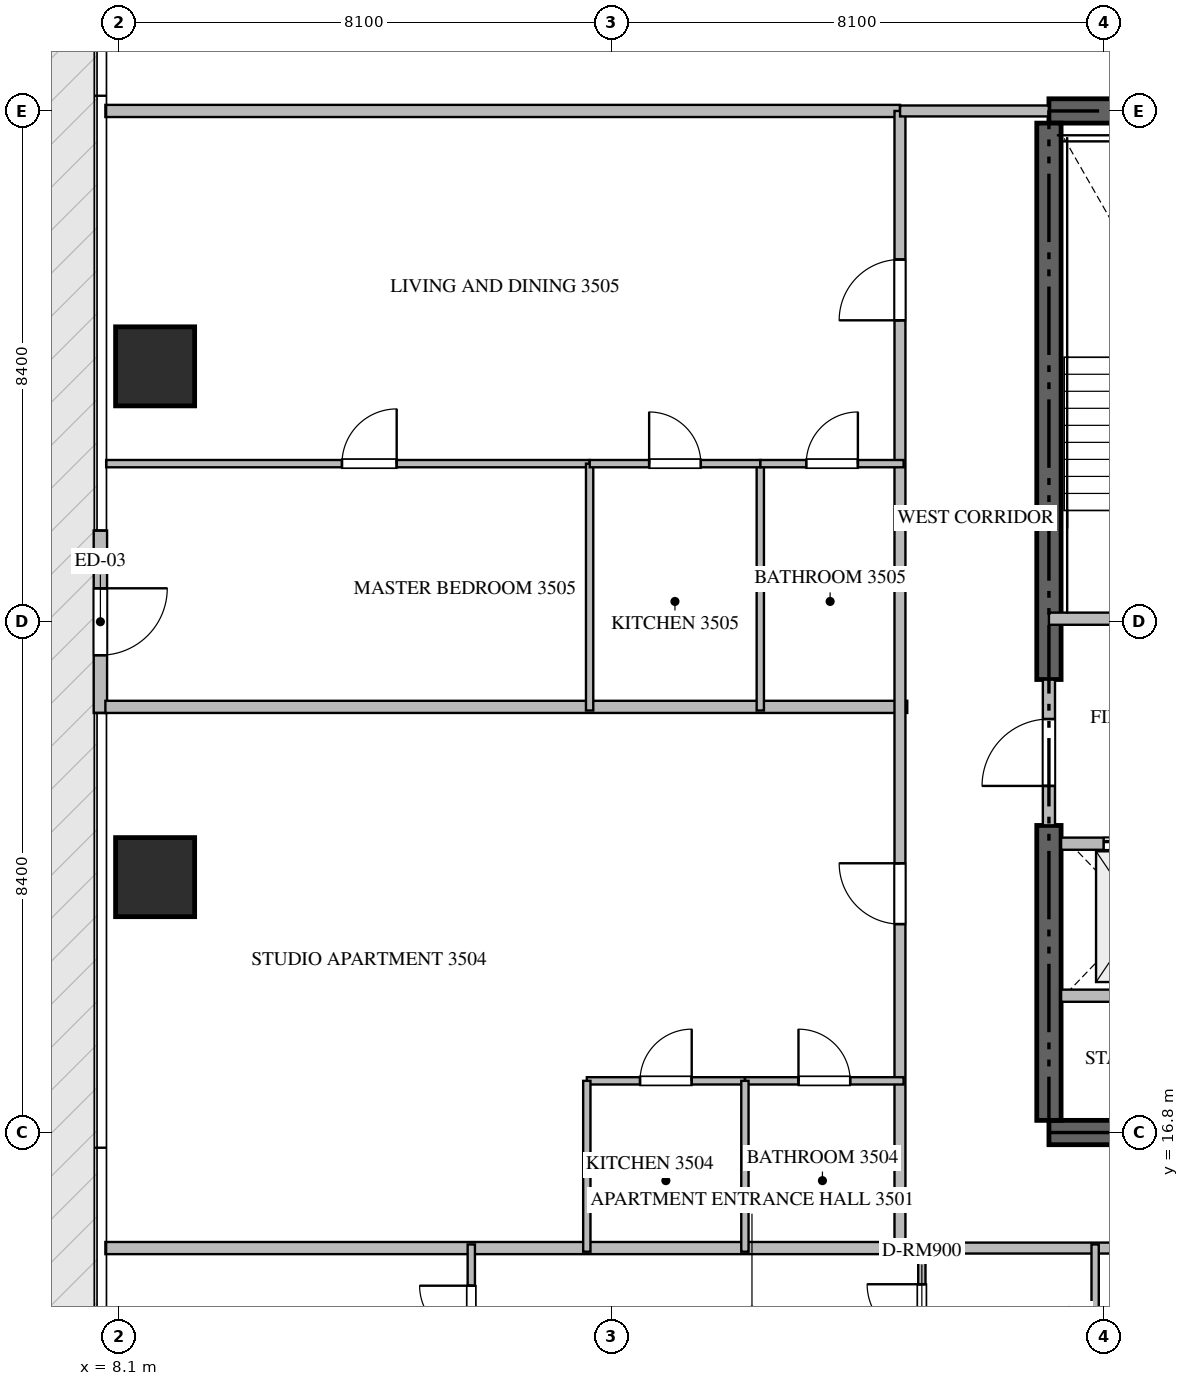
"""IFC4 building model, lengths in metres.
Left out: names, types, materials, properties, quantities, classifications, styles, units other than length and angle.
Written with IfcOpenShell. Run it as: python <this file> out.ifc"""

import sys

from ifc_helpers import new_model, si_unit, direction, frame, frame_2d, origin, origin_2d, place, context, subcontext, project, spatial, rectangle, extrude, source, transform, mapped, element, fill, save


model = new_model("IFC4")
c1 = context("Model", 3, precision=1e-05, world=origin(), true_north=direction((0.0, 1.0)))
c2 = subcontext(c1, "Body", "Model", "MODEL_VIEW")
j1 = project(units=[si_unit("LENGTHUNIT", "METRE"), si_unit("PLANEANGLEUNIT", "RADIAN")], contexts=[c1])
p1 = place(None, origin())
s1 = spatial("IfcSite", under=j1, at=p1, CompositionType="ELEMENT")
p2 = place(p1, origin())
s2 = spatial("IfcBuilding", under=s1, at=p2, CompositionType="ELEMENT")
p3 = place(p2, frame((0.0, 0.0, 142.65)))
s3 = spatial("IfcBuildingStorey", under=s2, at=p3, CompositionType="ELEMENT", Elevation=142.65)
for number, where, z_axis, x_axis in (
    (1, (23.4, 16.8, -0.26), (0.0, 0.0, 1.0), (1.0, 0.0, 0.0)),
    (2, (41.4, 33.6, -0.26), (0.0, 0.0, 1.0), (-1.0, 0.0, 0.0)),
):
    element("IfcWall", number, at=place(p3, frame(where, z_axis=z_axis, x_axis=x_axis)), inside=s3, PredefinedType="SHEAR", context=c2, shape_type="SweptSolid", body=[
        extrude(rectangle(XDim=18.0, YDim=0.4, at=frame_2d((9.0, 0.0))), origin(), (0.0, 0.0, 1.0), 3.748),
    ])
p4 = place(p3, frame((23.4, 17.0, -0.26), z_axis=(0.0, 0.0, 1.0), x_axis=(0.0, 1.0, 0.0)))
e3 = element("IfcWall", 3, at=p4, inside=s3, PredefinedType="SHEAR", context=c2, shape_type="SweptSolid", body=[
    extrude(rectangle(XDim=4.85, YDim=0.4, at=frame_2d((2.425, 0.0))), origin(), (0.0, 0.0, 1.0), 3.748),
])
p5 = place(p3, frame((23.4, 24.25, -0.26), z_axis=(0.0, 0.0, 1.0), x_axis=(0.0, 1.0, 0.0)))
e4 = element("IfcWall", 4, at=p5, inside=s3, PredefinedType="SHEAR", context=c2, shape_type="SweptSolid", body=[
    extrude(rectangle(XDim=9.15, YDim=0.4, at=frame_2d((4.575, 0.0))), origin(), (0.0, 0.0, 1.0), 3.748),
])
m1 = source(origin(), c2, "Body", "SweptSolid", [
    extrude(rectangle(XDim=1.3, YDim=1.3, at=origin_2d()), origin(), (0.0, 0.0, 1.0), 3.75),
])
for number, where, z_axis, x_axis in (
    (5, (8.7, 21.0, -0.26), (0.0, 0.0, 1.0), (1.0, 0.0, 0.0)),
    (6, (8.7, 29.4, -0.26), (0.0, 0.0, 1.0), (1.0, 0.0, 0.0)),
):
    element("IfcColumn", number, at=place(p3, frame(where, z_axis=z_axis, x_axis=x_axis)), inside=s3, PredefinedType="COLUMN", context=c2, shape_type="MappedRepresentation", body=[
        mapped(m1, transform((0.0, 0.0, 0.0), scale=1.0)),
    ])
p6 = place(p3, frame((7.8, 26.7, 0.0), z_axis=(0.0, 0.0, 1.0), x_axis=(0.0, -1.0, 0.0)))
e7 = element("IfcWall", 7, at=p6, inside=s3, PredefinedType="ELEMENTEDWALL", context=c2, shape_type="SweptSolid", body=[
    extrude(rectangle(XDim=3.0, YDim=0.22, at=frame_2d((1.5, 0.0))), origin(), (0.0, 0.0, 1.0), 3.475),
])
p7 = place(p6, frame((0.95, 0.0, 0.0)))
e8 = element("IfcOpeningElement", 8, at=p7, cuts=e7, PredefinedType="OPENING", context=c2, shape_type="SweptSolid", body=[
    extrude(rectangle(XDim=1.1, YDim=2.2, at=frame_2d((0.55, 1.1))), frame((0.0, 0.12, 0.0), z_axis=(0.0, -1.0, 0.0), x_axis=(1.0, 0.0, 0.0)), (0.0, 0.0, 1.0), 0.24),
])
p8 = place(p3, frame((23.4, 25.25, 0.0), z_axis=(0.0, 0.0, 1.0), x_axis=(1.0, 0.0, 0.0)))
e9 = element("IfcWall", 9, at=p8, inside=s3, PredefinedType="STANDARD", context=c2, shape_type="SweptSolid", body=[
    extrude(rectangle(XDim=4.45, YDim=0.2, at=frame_2d((2.225, 0.0))), origin(), (0.0, 0.0, 1.0), 3.49),
])
p9 = place(p8, frame((1.65, 0.0, 0.0)))
e10 = element("IfcOpeningElement", 10, at=p9, cuts=e9, PredefinedType="OPENING", context=c2, shape_type="SweptSolid", body=[
    extrude(rectangle(XDim=1.1, YDim=2.15, at=frame_2d((0.55, 1.075))), frame((0.0, 0.11, 0.0), z_axis=(0.0, -1.0, 0.0), x_axis=(1.0, 0.0, 0.0)), (0.0, 0.0, 1.0), 0.22),
])
p10 = place(p3, frame((23.6, 21.55, 0.0), z_axis=(0.0, 0.0, 1.0), x_axis=(1.0, 0.0, 0.0)))
e11 = element("IfcWall", 11, at=p10, inside=s3, PredefinedType="STANDARD", context=c2, shape_type="SweptSolid", body=[
    extrude(rectangle(XDim=2.45, YDim=0.2, at=frame_2d((1.225, 0.0))), origin(), (0.0, 0.0, 1.0), 3.49),
])
p11 = place(p10, frame((0.7, 0.0, 0.0)))
e12 = element("IfcOpeningElement", 12, at=p11, cuts=e11, PredefinedType="OPENING", context=c2, shape_type="SweptSolid", body=[
    extrude(rectangle(XDim=1.2, YDim=2.2, at=frame_2d((0.6, 1.1))), frame((0.0, 0.11, 0.0), z_axis=(0.0, -1.0, 0.0), x_axis=(1.0, 0.0, 0.0)), (0.0, 0.0, 1.0), 0.22),
])
p12 = place(p3, frame((23.6, 19.05, 0.0), z_axis=(0.0, 0.0, 1.0), x_axis=(1.0, 0.0, 0.0)))
e13 = element("IfcWall", 13, at=p12, inside=s3, PredefinedType="STANDARD", context=c2, shape_type="SweptSolid", body=[
    extrude(rectangle(XDim=2.45, YDim=0.2, at=frame_2d((1.225, 0.0))), origin(), (0.0, 0.0, 1.0), 3.49),
])
p13 = place(p3, frame((23.4, 21.852, 0.0), z_axis=(0.0, 0.0, 1.0), x_axis=(0.0, 1.0, 0.0)))
e14 = element("IfcWall", 14, at=p13, inside=s3, PredefinedType="STANDARD", context=c2, shape_type="SweptSolid", body=[
    extrude(rectangle(XDim=2.396, YDim=0.2, at=frame_2d((1.198, 0.0))), origin(), (0.0, 0.0, 1.0), 3.49),
])
p14 = place(p13, frame((0.648, 0.0, 0.0)))
e15 = element("IfcOpeningElement", 15, at=p14, cuts=e14, PredefinedType="OPENING", context=c2, shape_type="SweptSolid", body=[
    extrude(rectangle(XDim=1.1, YDim=2.15, at=frame_2d((0.55, 1.075))), frame((0.0, 0.11, 0.0), z_axis=(0.0, -1.0, 0.0), x_axis=(1.0, 0.0, 0.0)), (0.0, 0.0, 1.0), 0.22),
])
p15 = place(p3, frame((7.882, 23.8, 0.0), z_axis=(0.0, 0.0, 1.0), x_axis=(1.0, 0.0, 0.0)))
e16 = element("IfcWall", 16, at=p15, inside=s3, PredefinedType="PARTITIONING", context=c2, shape_type="SweptSolid", body=[
    extrude(rectangle(XDim=13.188, YDim=0.2, at=frame_2d((6.594, 0.0))), origin(), (0.0, 0.0, 1.0), 3.49),
])
for number, where, z_axis, x_axis in (
    (17, (7.882, 14.9, 0.0), (0.0, 0.0, 1.0), (1.0, 0.0, 0.0)),
    (18, (7.882, 33.6, 0.0), (0.0, 0.0, 1.0), (1.0, 0.0, 0.0)),
):
    element("IfcWall", number, at=place(p3, frame(where, z_axis=z_axis, x_axis=x_axis)), inside=s3, PredefinedType="PARTITIONING", context=c2, shape_type="SweptSolid", body=[
        extrude(rectangle(XDim=13.068, YDim=0.2, at=frame_2d((6.534, 0.0))), origin(), (0.0, 0.0, 1.0), 3.49),
    ])
p16 = place(p3, frame((20.952, 14.9, 0.0), z_axis=(0.0, 0.0, 1.0), x_axis=(1.0, 0.0, 0.0)))
e19 = element("IfcWall", 19, at=p16, inside=s3, PredefinedType="PARTITIONING", context=c2, shape_type="SweptSolid", body=[
    extrude(rectangle(XDim=22.896, YDim=0.18, at=frame_2d((11.448, 0.0))), origin(), (0.0, 0.0, 1.0), 3.49),
])
p17 = place(p16, frame((5.386, 0.0, 0.0)))
e20 = element("IfcOpeningElement", 20, at=p17, cuts=e19, PredefinedType="OPENING", context=c2, shape_type="SweptSolid", body=[
    extrude(rectangle(XDim=1.0, YDim=2.15, at=frame_2d((0.5, 1.075))), frame((0.0, 0.1, 0.0), z_axis=(0.0, -1.0, 0.0), x_axis=(1.0, 0.0, 0.0)), (0.0, 0.0, 1.0), 0.2),
])
p18 = place(p16, frame((10.948, 0.0, 0.0)))
e21 = element("IfcOpeningElement", 21, at=p18, cuts=e19, PredefinedType="OPENING", context=c2, shape_type="SweptSolid", body=[
    extrude(rectangle(XDim=1.0, YDim=2.15, at=frame_2d((0.5, 1.075))), frame((0.0, 0.1, 0.0), z_axis=(0.0, -1.0, 0.0), x_axis=(1.0, 0.0, 0.0)), (0.0, 0.0, 1.0), 0.2),
])
p19 = place(p3, frame((20.95, 14.9, 0.0), z_axis=(0.0, 0.0, 1.0), x_axis=(0.0, 1.0, 0.0)))
e22 = element("IfcWall", 22, at=p19, inside=s3, PredefinedType="PARTITIONING", context=c2, shape_type="SweptSolid", body=[
    extrude(rectangle(XDim=18.7, YDim=0.18, at=frame_2d((9.35, 0.0))), origin(), (0.0, 0.0, 1.0), 3.49),
])
p20 = place(p19, frame((5.328, 0.0, 0.0)))
e23 = element("IfcOpeningElement", 23, at=p20, cuts=e22, PredefinedType="OPENING", context=c2, shape_type="SweptSolid", body=[
    extrude(rectangle(XDim=1.0, YDim=2.15, at=frame_2d((0.5, 1.075))), frame((0.0, 0.1, 0.0), z_axis=(0.0, -1.0, 0.0), x_axis=(1.0, 0.0, 0.0)), (0.0, 0.0, 1.0), 0.2),
])
p21 = place(p19, frame((15.257, 0.0, 0.0)))
e24 = element("IfcOpeningElement", 24, at=p21, cuts=e22, PredefinedType="OPENING", context=c2, shape_type="SweptSolid", body=[
    extrude(rectangle(XDim=1.0, YDim=2.15, at=frame_2d((0.5, 1.075))), frame((0.0, 0.1, 0.0), z_axis=(0.0, -1.0, 0.0), x_axis=(1.0, 0.0, 0.0)), (0.0, 0.0, 1.0), 0.2),
])
p22 = place(p3, frame((20.952, 33.6, 0.0), z_axis=(0.0, 0.0, 1.0), x_axis=(1.0, 0.0, 0.0)))
e25 = element("IfcWall", 25, at=p22, inside=s3, PredefinedType="PARTITIONING", context=c2, shape_type="SweptSolid", body=[
    extrude(rectangle(XDim=2.446, YDim=0.18, at=frame_2d((1.223, 0.0))), origin(), (0.0, 0.0, 1.0), 3.49),
])
p23 = place(p3, frame((24.16, 12.15, 0.0), z_axis=(0.0, 0.0, 1.0), x_axis=(0.0, 1.0, 0.0)))
e26 = element("IfcWall", 26, at=p23, inside=s3, PredefinedType="PARTITIONING", context=c2, shape_type="SweptSolid", body=[
    extrude(rectangle(XDim=2.81, YDim=0.12, at=frame_2d((1.405, 0.0))), origin(), (0.0, 0.0, 1.0), 3.49),
])
p24 = place(p3, frame((21.31, 12.75, 0.0), z_axis=(0.0, 0.0, 1.0), x_axis=(0.0, 1.0, 0.0)))
e27 = element("IfcWall", 27, at=p24, inside=s3, PredefinedType="PARTITIONING", context=c2, shape_type="SweptSolid", body=[
    extrude(rectangle(XDim=2.21, YDim=0.12, at=frame_2d((1.105, 0.0))), origin(), (0.0, 0.0, 1.0), 3.49),
])
p25 = place(p24, frame((0.655, 0.0, 0.0)))
e28 = element("IfcOpeningElement", 28, at=p25, cuts=e27, PredefinedType="OPENING", context=c2, shape_type="SweptSolid", body=[
    extrude(rectangle(XDim=0.9, YDim=2.1, at=frame_2d((0.45, 1.05))), frame((0.0, 0.07, 0.0), z_axis=(0.0, -1.0, 0.0), x_axis=(1.0, 0.0, 0.0)), (0.0, 0.0, 1.0), 0.14),
])
p26 = place(p3, frame((13.9, 12.752, 0.0), z_axis=(0.0, 0.0, 1.0), x_axis=(0.0, 1.0, 0.0)))
e29 = element("IfcWall", 29, at=p26, inside=s3, PredefinedType="PARTITIONING", context=c2, shape_type="SweptSolid", body=[
    extrude(rectangle(XDim=2.208, YDim=0.12, at=frame_2d((1.104, 0.0))), origin(), (0.0, 0.0, 1.0), 3.49),
])
p27 = place(p26, frame((0.679, 0.0, 0.0)))
e30 = element("IfcOpeningElement", 30, at=p27, cuts=e29, PredefinedType="OPENING", context=c2, shape_type="SweptSolid", body=[
    extrude(rectangle(XDim=0.85, YDim=2.1, at=frame_2d((0.425, 1.05))), frame((0.0, 0.07, 0.0), z_axis=(0.0, -1.0, 0.0), x_axis=(1.0, 0.0, 0.0)), (0.0, 0.0, 1.0), 0.14),
])
p28 = place(p3, frame((15.8, 17.65, 0.0), z_axis=(0.0, 0.0, 1.0), x_axis=(1.0, 0.0, 0.0)))
e31 = element("IfcWall", 31, at=p28, inside=s3, PredefinedType="PARTITIONING", context=c2, shape_type="SweptSolid", body=[
    extrude(rectangle(XDim=2.6, YDim=0.12, at=frame_2d((1.3, 0.0))), origin(), (0.0, 0.0, 1.0), 3.49),
])
p29 = place(p28, frame((0.875, 0.0, 0.0)))
e32 = element("IfcOpeningElement", 32, at=p29, cuts=e31, PredefinedType="OPENING", context=c2, shape_type="SweptSolid", body=[
    extrude(rectangle(XDim=0.85, YDim=2.1, at=frame_2d((0.425, 1.05))), frame((0.0, 0.07, 0.0), z_axis=(0.0, -1.0, 0.0), x_axis=(1.0, 0.0, 0.0)), (0.0, 0.0, 1.0), 0.14),
])
p30 = place(p3, frame((18.402, 17.65, 0.0), z_axis=(0.0, 0.0, 1.0), x_axis=(1.0, 0.0, 0.0)))
e33 = element("IfcWall", 33, at=p30, inside=s3, PredefinedType="PARTITIONING", context=c2, shape_type="SweptSolid", body=[
    extrude(rectangle(XDim=2.608, YDim=0.12, at=frame_2d((1.304, 0.0))), origin(), (0.0, 0.0, 1.0), 3.49),
])
p31 = place(p30, frame((0.879, 0.0, 0.0)))
e34 = element("IfcOpeningElement", 34, at=p31, cuts=e33, PredefinedType="OPENING", context=c2, shape_type="SweptSolid", body=[
    extrude(rectangle(XDim=0.85, YDim=2.1, at=frame_2d((0.425, 1.05))), frame((0.0, 0.07, 0.0), z_axis=(0.0, -1.0, 0.0), x_axis=(1.0, 0.0, 0.0)), (0.0, 0.0, 1.0), 0.14),
])
for number, where, z_axis, x_axis in (
    (35, (18.4, 14.84, 0.0), (0.0, 0.0, 1.0), (0.0, 1.0, 0.0)),
    (36, (15.8, 14.84, 0.0), (0.0, 0.0, 1.0), (0.0, 1.0, 0.0)),
):
    element("IfcWall", number, at=place(p3, frame(where, z_axis=z_axis, x_axis=x_axis)), inside=s3, PredefinedType="PARTITIONING", context=c2, shape_type="SweptSolid", body=[
        extrude(rectangle(XDim=2.81, YDim=0.12, at=frame_2d((1.405, 0.0))), origin(), (0.0, 0.0, 1.0), 3.49),
    ])
p32 = place(p3, frame((7.895, 27.8, 0.0), z_axis=(0.0, 0.0, 1.0), x_axis=(1.0, 0.0, 0.0)))
e37 = element("IfcWall", 37, at=p32, inside=s3, PredefinedType="PARTITIONING", context=c2, shape_type="SweptSolid", body=[
    extrude(rectangle(XDim=7.951, YDim=0.12, at=frame_2d((3.976, 0.0))), origin(), (0.0, 0.0, 1.0), 3.49),
])
p33 = place(p32, frame((3.878, 0.0, 0.0)))
e38 = element("IfcOpeningElement", 38, at=p33, cuts=e37, PredefinedType="OPENING", context=c2, shape_type="SweptSolid", body=[
    extrude(rectangle(XDim=0.9, YDim=2.1, at=frame_2d((0.45, 1.05))), frame((0.0, 0.07, 0.0), z_axis=(0.0, -1.0, 0.0), x_axis=(1.0, 0.0, 0.0)), (0.0, 0.0, 1.0), 0.14),
])
for number, where, z_axis, x_axis in (
    (39, (15.846, 23.74, 0.0), (0.0, 0.0, 1.0), (0.0, 1.0, 0.0)),
    (40, (18.653, 23.74, 0.0), (0.0, 0.0, 1.0), (0.0, 1.0, 0.0)),
):
    element("IfcWall", number, at=place(p3, frame(where, z_axis=z_axis, x_axis=x_axis)), inside=s3, PredefinedType="PARTITIONING", context=c2, shape_type="SweptSolid", body=[
        extrude(rectangle(XDim=4.06, YDim=0.12, at=frame_2d((2.03, 0.0))), origin(), (0.0, 0.0, 1.0), 3.49),
    ])
p34 = place(p3, frame((15.848, 27.8, 0.0), z_axis=(0.0, 0.0, 1.0), x_axis=(1.0, 0.0, 0.0)))
e41 = element("IfcWall", 41, at=p34, inside=s3, PredefinedType="PARTITIONING", context=c2, shape_type="SweptSolid", body=[
    extrude(rectangle(XDim=2.805, YDim=0.12, at=frame_2d((1.403, 0.0))), origin(), (0.0, 0.0, 1.0), 3.49),
])
p35 = place(p34, frame((0.977, 0.0, 0.0)))
e42 = element("IfcOpeningElement", 42, at=p35, cuts=e41, PredefinedType="OPENING", context=c2, shape_type="SweptSolid", body=[
    extrude(rectangle(XDim=0.85, YDim=2.1, at=frame_2d((0.425, 1.05))), frame((0.0, 0.07, 0.0), z_axis=(0.0, -1.0, 0.0), x_axis=(1.0, 0.0, 0.0)), (0.0, 0.0, 1.0), 0.14),
])
p36 = place(p3, frame((18.655, 27.8, 0.0), z_axis=(0.0, 0.0, 1.0), x_axis=(1.0, 0.0, 0.0)))
e43 = element("IfcWall", 43, at=p36, inside=s3, PredefinedType="PARTITIONING", context=c2, shape_type="SweptSolid", body=[
    extrude(rectangle(XDim=2.355, YDim=0.12, at=frame_2d((1.177, 0.0))), origin(), (0.0, 0.0, 1.0), 3.49),
])
p37 = place(p36, frame((0.753, 0.0, 0.0)))
e44 = element("IfcOpeningElement", 44, at=p37, cuts=e43, PredefinedType="OPENING", context=c2, shape_type="SweptSolid", body=[
    extrude(rectangle(XDim=0.85, YDim=2.1, at=frame_2d((0.425, 1.05))), frame((0.0, 0.07, 0.0), z_axis=(0.0, -1.0, 0.0), x_axis=(1.0, 0.0, 0.0)), (0.0, 0.0, 1.0), 0.14),
])
m2 = source(origin(), c2, "Body", "SweptSolid", [
    extrude(rectangle(XDim=1.1, YDim=2.2, at=frame_2d((0.55, 1.1))), frame((0.0, 0.025, 0.0), z_axis=(0.0, -1.0, 0.0), x_axis=(1.0, 0.0, 0.0)), (0.0, 0.0, 1.0), 0.05),
])
p38 = place(p7, origin())
e45 = element("IfcDoor", 45, at=p38, inside=s3, OperationType="SINGLE_SWING_LEFT", PredefinedType="DOOR", context=c2, shape_type="MappedRepresentation", body=[
    mapped(m2, transform((0.0, 0.0, 0.0), scale=1.0)),
])
fill(e8, e45)
m3 = source(origin(), c2, "Body", "SweptSolid", [
    extrude(rectangle(XDim=1.2, YDim=2.2, at=frame_2d((0.6, 1.1))), frame((0.0, 0.025, 0.0), z_axis=(0.0, -1.0, 0.0), x_axis=(1.0, 0.0, 0.0)), (0.0, 0.0, 1.0), 0.05),
])
p39 = place(p11, origin())
e46 = element("IfcDoor", 46, at=p39, inside=s3, OperationType="DOUBLE_DOOR_SLIDING", PredefinedType="DOOR", context=c2, shape_type="MappedRepresentation", body=[
    mapped(m3, transform((0.0, 0.0, 0.0), scale=1.0)),
])
fill(e12, e46)
m4 = source(origin(), c2, "Body", "SweptSolid", [
    extrude(rectangle(XDim=1.1, YDim=2.15, at=frame_2d((0.55, 1.075))), frame((0.0, 0.025, 0.0), z_axis=(0.0, -1.0, 0.0), x_axis=(1.0, 0.0, 0.0)), (0.0, 0.0, 1.0), 0.05),
])
p40 = place(p14, origin())
e47 = element("IfcDoor", 47, at=p40, inside=s3, OperationType="SINGLE_SWING_LEFT", PredefinedType="DOOR", context=c2, shape_type="MappedRepresentation", body=[
    mapped(m4, transform((0.0, 0.0, 0.0), scale=1.0)),
])
fill(e15, e47)
m5 = source(origin(), c2, "Body", "SweptSolid", [
    extrude(rectangle(XDim=1.0, YDim=2.15, at=frame_2d((0.5, 1.075))), frame((0.0, 0.025, 0.0), z_axis=(0.0, -1.0, 0.0), x_axis=(1.0, 0.0, 0.0)), (0.0, 0.0, 1.0), 0.05),
])
p41 = place(p20, origin())
e48 = element("IfcDoor", 48, at=p41, inside=s3, OperationType="SINGLE_SWING_RIGHT", PredefinedType="DOOR", context=c2, shape_type="MappedRepresentation", body=[
    mapped(m5, transform((0.0, 0.0, 0.0), scale=1.0)),
])
fill(e23, e48)
p42 = place(p21, origin())
e49 = element("IfcDoor", 49, at=p42, inside=s3, OperationType="SINGLE_SWING_LEFT", PredefinedType="DOOR", context=c2, shape_type="MappedRepresentation", body=[
    mapped(m5, transform((0.0, 0.0, 0.0), scale=1.0)),
])
fill(e24, e49)
m6 = source(origin(), c2, "Body", "SweptSolid", [
    extrude(rectangle(XDim=0.9, YDim=2.1, at=frame_2d((0.45, 1.05))), frame((0.0, 0.025, 0.0), z_axis=(0.0, -1.0, 0.0), x_axis=(1.0, 0.0, 0.0)), (0.0, 0.0, 1.0), 0.05),
])
p43 = place(p25, origin())
e50 = element("IfcDoor", 50, at=p43, inside=s3, OperationType="SINGLE_SWING_RIGHT", PredefinedType="DOOR", context=c2, shape_type="MappedRepresentation", body=[
    mapped(m6, transform((0.0, 0.0, 0.0), scale=1.0)),
])
fill(e28, e50)
m7 = source(origin(), c2, "Body", "SweptSolid", [
    extrude(rectangle(XDim=0.85, YDim=2.1, at=frame_2d((0.425, 1.05))), frame((0.0, 0.025, 0.0), z_axis=(0.0, -1.0, 0.0), x_axis=(1.0, 0.0, 0.0)), (0.0, 0.0, 1.0), 0.05),
])
p44 = place(p27, origin())
e51 = element("IfcDoor", 51, at=p44, inside=s3, OperationType="SINGLE_SWING_RIGHT", PredefinedType="DOOR", context=c2, shape_type="MappedRepresentation", body=[
    mapped(m7, transform((0.0, 0.0, 0.0), scale=1.0)),
])
fill(e30, e51)
p45 = place(p29, origin())
e52 = element("IfcDoor", 52, at=p45, inside=s3, OperationType="SINGLE_SWING_RIGHT", PredefinedType="DOOR", context=c2, shape_type="MappedRepresentation", body=[
    mapped(m7, transform((0.0, 0.0, 0.0), scale=1.0)),
])
fill(e32, e52)
p46 = place(p31, origin())
e53 = element("IfcDoor", 53, at=p46, inside=s3, OperationType="SINGLE_SWING_LEFT", PredefinedType="DOOR", context=c2, shape_type="MappedRepresentation", body=[
    mapped(m7, transform((0.0, 0.0, 0.0), scale=1.0)),
])
fill(e34, e53)
p47 = place(p33, origin())
e54 = element("IfcDoor", 54, at=p47, inside=s3, OperationType="SINGLE_SWING_RIGHT", PredefinedType="DOOR", context=c2, shape_type="MappedRepresentation", body=[
    mapped(m6, transform((0.0, 0.0, 0.0), scale=1.0)),
])
fill(e38, e54)
p48 = place(p35, origin())
e55 = element("IfcDoor", 55, at=p48, inside=s3, OperationType="SINGLE_SWING_LEFT", PredefinedType="DOOR", context=c2, shape_type="MappedRepresentation", body=[
    mapped(m7, transform((0.0, 0.0, 0.0), scale=1.0)),
])
fill(e42, e55)
p49 = place(p37, origin())
e56 = element("IfcDoor", 56, at=p49, inside=s3, OperationType="SINGLE_SWING_RIGHT", PredefinedType="DOOR", context=c2, shape_type="MappedRepresentation", body=[
    mapped(m7, transform((0.0, 0.0, 0.0), scale=1.0)),
])
fill(e44, e56)
save(model, sys.argv[1])
